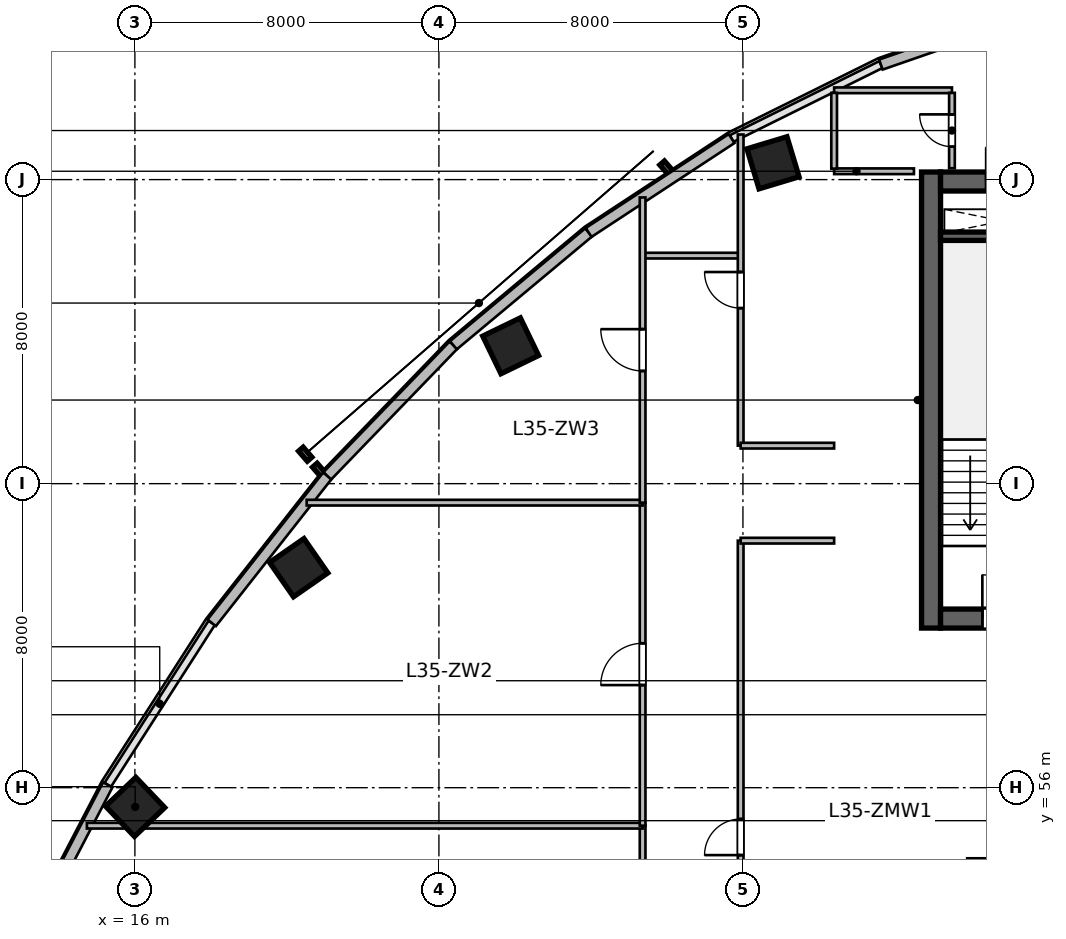
"""IFC4 building model, lengths in metres.
Left out: names, types, materials, properties, quantities, classifications, styles, units other than length and angle.
Written with IfcOpenShell. Run it as: python <this file> out.ifc"""

import sys

from ifc_helpers import new_model, si_unit, direction, frame, frame_2d, origin, origin_2d, place, context, subcontext, project, spatial, rectangle, extrude, source, transform, mapped, element, fill, save


model = new_model("IFC4")
c1 = context("Model", 3, precision=1e-05, world=origin(), true_north=direction((0.0, 1.0)))
c2 = subcontext(c1, "Body", "Model", "MODEL_VIEW")
j1 = project(units=[si_unit("LENGTHUNIT", "METRE"), si_unit("PLANEANGLEUNIT", "RADIAN")], contexts=[c1])
p1 = place(None, origin())
s1 = spatial("IfcSite", under=j1, at=p1, CompositionType="ELEMENT")
p2 = place(p1, origin())
s2 = spatial("IfcBuilding", under=s1, at=p2, CompositionType="ELEMENT")
p3 = place(p2, frame((0.0, 0.0, 146.7)))
s3 = spatial("IfcBuildingStorey", under=s2, at=p3, CompositionType="ELEMENT", Elevation=146.7)
m1 = source(origin(), c2, "Body", "SweptSolid", [
    extrude(rectangle(XDim=12.0, YDim=0.5, at=frame_2d((6.0, 0.0))), origin(), (0.0, 0.0, 1.0), 3.9),
])
p4 = place(p3, frame((36.95, 60.2, 0.0), z_axis=(0.0, 0.0, 1.0), x_axis=(0.0, 1.0, 0.0)))
e1 = element("IfcWall", 1, at=p4, inside=s3, PredefinedType="SHEAR", context=c2, shape_type="MappedRepresentation", body=[
    mapped(m1, transform((0.0, 0.0, 0.0), scale=1.0)),
])
m2 = source(origin(), c2, "Body", "SweptSolid", [
    extrude(rectangle(XDim=21.6, YDim=0.5, at=frame_2d((10.8, 0.0))), origin(), (0.0, 0.0, 1.0), 3.9),
])
p5 = place(p3, frame((37.2, 60.45, 0.0), z_axis=(0.0, 0.0, 1.0), x_axis=(1.0, 0.0, 0.0)))
e2 = element("IfcWall", 2, at=p5, inside=s3, PredefinedType="SHEAR", context=c2, shape_type="MappedRepresentation", body=[
    mapped(m2, transform((0.0, 0.0, 0.0), scale=1.0)),
])
p6 = place(p5, frame((1.1, 0.0, 0.0)))
e3 = element("IfcOpeningElement", 3, at=p6, cuts=e2, PredefinedType="OPENING", context=c2, shape_type="SweptSolid", body=[
    extrude(rectangle(XDim=1.15, YDim=2.15, at=frame_2d((0.575, 1.075))), frame((0.0, 0.26, 0.0), z_axis=(0.0, -1.0, 0.0), x_axis=(1.0, 0.0, 0.0)), (0.0, 0.0, 1.0), 0.52),
])
p7 = place(p5, frame((19.5, 0.0, 0.0)))
e4 = element("IfcOpeningElement", 4, at=p7, cuts=e2, PredefinedType="OPENING", context=c2, shape_type="SweptSolid", body=[
    extrude(rectangle(XDim=0.9, YDim=2.1, at=frame_2d((0.45, 1.05))), frame((0.0, 0.26, 0.0), z_axis=(0.0, -1.0, 0.0), x_axis=(1.0, 0.0, 0.0)), (0.0, 0.0, 1.0), 0.52),
])
p8 = place(p5, frame((12.02, 0.0, 0.0)))
e5 = element("IfcOpeningElement", 5, at=p8, cuts=e2, PredefinedType="OPENING", context=c2, shape_type="SweptSolid", body=[
    extrude(rectangle(XDim=1.6, YDim=2.15, at=frame_2d((0.8, 1.075))), frame((0.0, 0.26, 0.0), z_axis=(0.0, -1.0, 0.0), x_axis=(1.0, 0.0, 0.0)), (0.0, 0.0, 1.0), 0.52),
])
p9 = place(p3, frame((37.2, 71.95, 0.0), z_axis=(0.0, 0.0, 1.0), x_axis=(1.0, 0.0, 0.0)))
e6 = element("IfcWall", 6, at=p9, inside=s3, PredefinedType="SHEAR", context=c2, shape_type="MappedRepresentation", body=[
    mapped(m2, transform((0.0, 0.0, 0.0), scale=1.0)),
])
p10 = place(p9, frame((1.2, 0.0, 0.0)))
e7 = element("IfcOpeningElement", 7, at=p10, cuts=e6, PredefinedType="OPENING", context=c2, shape_type="SweptSolid", body=[
    extrude(rectangle(XDim=0.9, YDim=2.1, at=frame_2d((0.45, 1.05))), frame((0.0, 0.26, 0.0), z_axis=(0.0, -1.0, 0.0), x_axis=(1.0, 0.0, 0.0)), (0.0, 0.0, 1.0), 0.52),
])
p11 = place(p9, frame((14.7, 0.0, 0.0)))
e8 = element("IfcOpeningElement", 8, at=p11, cuts=e6, PredefinedType="OPENING", context=c2, shape_type="SweptSolid", body=[
    extrude(rectangle(XDim=1.2, YDim=2.15, at=frame_2d((0.6, 1.075))), frame((0.0, 0.26, 0.0), z_axis=(0.0, -1.0, 0.0), x_axis=(1.0, 0.0, 0.0)), (0.0, 0.0, 1.0), 0.52),
])
p12 = place(p9, frame((4.15, 0.0, 0.0)))
e9 = element("IfcOpeningElement", 9, at=p12, cuts=e6, PredefinedType="OPENING", context=c2, shape_type="SweptSolid", body=[
    extrude(rectangle(XDim=1.3, YDim=2.15, at=frame_2d((0.65, 1.075))), frame((0.0, 0.26, 0.0), z_axis=(0.0, -1.0, 0.0), x_axis=(1.0, 0.0, 0.0)), (0.0, 0.0, 1.0), 0.52),
])
p13 = place(p9, frame((6.76, 0.0, 0.0)))
e10 = element("IfcOpeningElement", 10, at=p13, cuts=e6, PredefinedType="OPENING", context=c2, shape_type="SweptSolid", body=[
    extrude(rectangle(XDim=0.85, YDim=2.1, at=frame_2d((0.425, 1.05))), frame((0.0, 0.26, 0.0), z_axis=(0.0, -1.0, 0.0), x_axis=(1.0, 0.0, 0.0)), (0.0, 0.0, 1.0), 0.52),
])
p14 = place(p9, frame((8.76, 0.0, 0.0)))
e11 = element("IfcOpeningElement", 11, at=p14, cuts=e6, PredefinedType="OPENING", context=c2, shape_type="SweptSolid", body=[
    extrude(rectangle(XDim=0.85, YDim=2.1, at=frame_2d((0.425, 1.05))), frame((0.0, 0.26, 0.0), z_axis=(0.0, -1.0, 0.0), x_axis=(1.0, 0.0, 0.0)), (0.0, 0.0, 1.0), 0.52),
])
p15 = place(p9, frame((10.725, 0.0, 0.0)))
e12 = element("IfcOpeningElement", 12, at=p15, cuts=e6, PredefinedType="OPENING", context=c2, shape_type="SweptSolid", body=[
    extrude(rectangle(XDim=0.85, YDim=2.1, at=frame_2d((0.425, 1.05))), frame((0.0, 0.26, 0.0), z_axis=(0.0, -1.0, 0.0), x_axis=(1.0, 0.0, 0.0)), (0.0, 0.0, 1.0), 0.52),
])
m3 = source(origin(), c2, "Body", "SweptSolid", [
    extrude(rectangle(XDim=3.27, YDim=0.22, at=frame_2d((1.635, 0.0))), origin(), (0.0, 0.0, 1.0), 3.9),
])
p16 = place(p3, frame((37.2, 70.51, 0.0), z_axis=(0.0, 0.0, 1.0), x_axis=(1.0, 0.0, 0.0)))
e13 = element("IfcWall", 13, at=p16, inside=s3, PredefinedType="SHEAR", context=c2, shape_type="MappedRepresentation", body=[
    mapped(m3, transform((0.0, 0.0, 0.0), scale=1.0)),
])
m4 = source(origin(), c2, "Body", "SweptSolid", [
    extrude(rectangle(XDim=1.1, YDim=1.1, at=origin_2d()), origin(), (0.0, 0.0, 1.0), 3.9),
])
for number, where, z_axis, x_axis in (
    (14, (16.007, 55.494, 0.0), (0.0, 0.0, 1.0), (-0.691, 0.723, 0.0)),
    (15, (20.311, 61.789, 0.0), (0.0, 0.0, 1.0), (-0.571, 0.821, 0.0)),
    (16, (25.888, 67.627, 0.0), (0.0, 0.0, 1.0), (-0.436, 0.9, 0.0)),
    (17, (32.791, 72.442, 0.0), (0.0, 0.0, 1.0), (-0.289, 0.957, 0.0)),
):
    element("IfcColumn", number, at=place(p3, frame(where, z_axis=z_axis, x_axis=x_axis)), inside=s3, PredefinedType="COLUMN", context=c2, shape_type="MappedRepresentation", body=[
        mapped(m4, transform((0.0, 0.0, 0.0), scale=1.0)),
    ])
m5 = source(origin(), c2, "Body", "SweptSolid", [
    extrude(rectangle(XDim=5.171, YDim=0.28, at=frame_2d((2.585, 0.0))), origin(), (0.0, 0.0, 1.0), 3.65),
])
p17 = place(p3, frame((12.898, 51.489, 0.0), z_axis=(0.0, 0.0, 1.0), x_axis=(0.461752581363, 0.887008767491, 0.0)))
e18 = element("IfcWall", 18, at=p17, inside=s3, PredefinedType="SOLIDWALL", context=c2, shape_type="MappedRepresentation", body=[
    mapped(m5, transform((0.0, 0.0, 0.0), scale=1.0)),
])
p18 = place(p17, frame((0.193, 0.0, 0.95)))
e19 = element("IfcOpeningElement", 19, at=p18, cuts=e18, PredefinedType="OPENING", context=c2, shape_type="SweptSolid", body=[
    extrude(rectangle(XDim=2.2, YDim=2.1, at=frame_2d((1.1, 1.05))), frame((0.0, 0.15, 0.0), z_axis=(0.0, -1.0, 0.0), x_axis=(1.0, 0.0, 0.0)), (0.0, 0.0, 1.0), 0.3),
])
m6 = source(origin(), c2, "Body", "SweptSolid", [
    extrude(rectangle(XDim=4.922, YDim=0.28, at=frame_2d((2.461, 0.0))), origin(), (0.0, 0.0, 1.0), 3.65),
])
p19 = place(p3, frame((18.021, 60.338, 0.0), z_axis=(0.0, 0.0, 1.0), x_axis=(0.61817639101, 0.786039407153, 0.0)))
e20 = element("IfcWall", 20, at=p19, inside=s3, PredefinedType="SOLIDWALL", context=c2, shape_type="MappedRepresentation", body=[
    mapped(m6, transform((0.0, 0.0, 0.0), scale=1.0)),
])
m7 = source(origin(), c2, "Body", "SweptSolid", [
    extrude(rectangle(XDim=4.776, YDim=0.28, at=frame_2d((2.388, 0.0))), origin(), (0.0, 0.0, 1.0), 3.65),
])
p20 = place(p3, frame((21.064, 64.206, 0.0), z_axis=(0.0, 0.0, 1.0), x_axis=(0.694601811851, 0.719394414055, 0.0)))
e21 = element("IfcWall", 21, at=p20, inside=s3, PredefinedType="SOLIDWALL", context=c2, shape_type="MappedRepresentation", body=[
    mapped(m7, transform((0.0, 0.0, 0.0), scale=1.0)),
])
m8 = source(origin(), c2, "Body", "SweptSolid", [
    extrude(rectangle(XDim=4.634, YDim=0.28, at=frame_2d((2.317, 0.0))), origin(), (0.0, 0.0, 1.0), 3.65),
])
p21 = place(p3, frame((24.381, 67.642, 0.0), z_axis=(0.0, 0.0, 1.0), x_axis=(0.767910229096, 0.640557475993, 0.0)))
e22 = element("IfcWall", 22, at=p21, inside=s3, PredefinedType="SOLIDWALL", context=c2, shape_type="MappedRepresentation", body=[
    mapped(m8, transform((0.0, 0.0, 0.0), scale=1.0)),
])
m9 = source(origin(), c2, "Body", "SweptSolid", [
    extrude(rectangle(XDim=4.501, YDim=0.28, at=frame_2d((2.25, 0.0))), origin(), (0.0, 0.0, 1.0), 3.65),
])
p22 = place(p3, frame((27.939, 70.61, 0.0), z_axis=(0.0, 0.0, 1.0), x_axis=(0.835984920737, 0.548752414391, 0.0)))
e23 = element("IfcWall", 23, at=p22, inside=s3, PredefinedType="SOLIDWALL", context=c2, shape_type="MappedRepresentation", body=[
    mapped(m9, transform((0.0, 0.0, 0.0), scale=1.0)),
])
m10 = source(origin(), c2, "Body", "SweptSolid", [
    extrude(rectangle(XDim=4.29, YDim=0.28, at=frame_2d((2.145, 0.0))), origin(), (0.0, 0.0, 1.0), 3.65),
])
p23 = place(p3, frame((35.63, 75.027, 0.0), z_axis=(0.0, 0.0, 1.0), x_axis=(0.944883859218, 0.3274057003, 0.0)))
e24 = element("IfcWall", 24, at=p23, inside=s3, PredefinedType="SOLIDWALL", context=c2, shape_type="MappedRepresentation", body=[
    mapped(m10, transform((0.0, 0.0, 0.0), scale=1.0)),
])
m11 = source(origin(), c2, "Body", "SweptSolid", [
    extrude(rectangle(XDim=2.1, YDim=0.15, at=frame_2d((1.05, 0.0))), origin(), (0.0, 0.0, 1.0), 3.65),
])
p24 = place(p3, frame((34.4, 72.22, 0.0), z_axis=(0.0, 0.0, 1.0), x_axis=(1.0, 0.0, 0.0)))
e25 = element("IfcWall", 25, at=p24, inside=s3, PredefinedType="PARTITIONING", context=c2, shape_type="MappedRepresentation", body=[
    mapped(m11, transform((0.0, 0.0, 0.0), scale=1.0)),
])
m12 = source(origin(), c2, "Body", "SweptSolid", [
    extrude(rectangle(XDim=3.1, YDim=0.15, at=frame_2d((1.55, 0.0))), origin(), (0.0, 0.0, 1.0), 3.022),
])
p25 = place(p3, frame((34.4, 74.35, 0.0), z_axis=(0.0, 0.0, 1.0), x_axis=(1.0, 0.0, 0.0)))
e26 = element("IfcWall", 26, at=p25, inside=s3, PredefinedType="PARTITIONING", context=c2, shape_type="MappedRepresentation", body=[
    mapped(m12, transform((0.0, 0.0, 0.0), scale=1.0)),
])
m13 = source(origin(), c2, "Body", "SweptSolid", [
    extrude(rectangle(XDim=1.995, YDim=0.15, at=frame_2d((0.998, 0.0))), origin(), (0.0, 0.0, 1.0), 3.65),
])
p26 = place(p3, frame((34.4, 72.288, 0.0), z_axis=(0.0, 0.0, 1.0), x_axis=(0.0, 1.0, 0.0)))
e27 = element("IfcWall", 27, at=p26, inside=s3, PredefinedType="PARTITIONING", context=c2, shape_type="MappedRepresentation", body=[
    mapped(m13, transform((0.0, 0.0, 0.0), scale=1.0)),
])
m14 = source(origin(), c2, "Body", "SweptSolid", [
    extrude(rectangle(XDim=1.982, YDim=0.15, at=frame_2d((0.991, 0.0))), origin(), (0.0, 0.0, 1.0), 3.65),
])
p27 = place(p3, frame((37.5, 72.3, 0.0), z_axis=(0.0, 0.0, 1.0), x_axis=(0.0, 1.0, 0.0)))
e28 = element("IfcWall", 28, at=p27, inside=s3, PredefinedType="PARTITIONING", context=c2, shape_type="MappedRepresentation", body=[
    mapped(m14, transform((0.0, 0.0, 0.0), scale=1.0)),
])
p28 = place(p27, frame((0.566, 0.0, 0.0)))
e29 = element("IfcOpeningElement", 29, at=p28, cuts=e28, PredefinedType="OPENING", context=c2, shape_type="SweptSolid", body=[
    extrude(rectangle(XDim=0.85, YDim=2.1, at=frame_2d((0.425, 1.05))), frame((0.0, 0.085, 0.0), z_axis=(0.0, -1.0, 0.0), x_axis=(1.0, 0.0, 0.0)), (0.0, 0.0, 1.0), 0.17),
])
m15 = source(origin(), c2, "Body", "SweptSolid", [
    extrude(rectangle(XDim=2.5, YDim=0.15, at=frame_2d((1.25, 0.0))), origin(), (0.0, 0.0, 1.0), 3.65),
])
p29 = place(p3, frame((29.4, 70.0, 0.0), z_axis=(0.0, 0.0, 1.0), x_axis=(1.0, 0.0, 0.0)))
e30 = element("IfcWall", 30, at=p29, inside=s3, PredefinedType="PARTITIONING", context=c2, shape_type="MappedRepresentation", body=[
    mapped(m15, transform((0.0, 0.0, 0.0), scale=1.0)),
])
m16 = source(origin(), c2, "Body", "SweptSolid", [
    extrude(rectangle(XDim=11.612, YDim=0.15, at=frame_2d((5.806, 0.0))), origin(), (0.0, 0.0, 1.0), 2.942),
])
p30 = place(p3, frame((29.36, 43.388, 0.0), z_axis=(0.0, 0.0, 1.0), x_axis=(0.0, 1.0, 0.0)))
e31 = element("IfcWall", 31, at=p30, inside=s3, PredefinedType="PARTITIONING", context=c2, shape_type="MappedRepresentation", body=[
    mapped(m16, transform((0.0, 0.0, 0.0), scale=1.0)),
])
p31 = place(p30, frame((6.962, 0.0, 0.0)))
e32 = element("IfcOpeningElement", 32, at=p31, cuts=e31, PredefinedType="OPENING", context=c2, shape_type="SweptSolid", body=[
    extrude(rectangle(XDim=1.1, YDim=2.15, at=frame_2d((0.55, 1.075))), frame((0.0, 0.085, 0.0), z_axis=(0.0, -1.0, 0.0), x_axis=(1.0, 0.0, 0.0)), (0.0, 0.0, 1.0), 0.17),
])
m17 = source(origin(), c2, "Body", "SweptSolid", [
    extrude(rectangle(XDim=14.623, YDim=0.15, at=frame_2d((7.312, 0.0))), origin(), (0.0, 0.0, 1.0), 3.65),
])
p32 = place(p3, frame((14.737, 55.0, 0.0), z_axis=(0.0, 0.0, 1.0), x_axis=(1.0, 0.0, 0.0)))
e33 = element("IfcWall", 33, at=p32, inside=s3, PredefinedType="PARTITIONING", context=c2, shape_type="MappedRepresentation", body=[
    mapped(m17, transform((0.0, 0.0, 0.0), scale=1.0)),
])
m18 = source(origin(), c2, "Body", "SweptSolid", [
    extrude(rectangle(XDim=8.5, YDim=0.15, at=frame_2d((4.25, 0.0))), origin(), (0.0, 0.0, 1.0), 2.942),
])
p33 = place(p3, frame((29.36, 55.0, 0.0), z_axis=(0.0, 0.0, 1.0), x_axis=(0.0, 1.0, 0.0)))
e34 = element("IfcWall", 34, at=p33, inside=s3, PredefinedType="PARTITIONING", context=c2, shape_type="MappedRepresentation", body=[
    mapped(m18, transform((0.0, 0.0, 0.0), scale=1.0)),
])
p34 = place(p33, frame((3.7, 0.0, 0.0)))
e35 = element("IfcOpeningElement", 35, at=p34, cuts=e34, PredefinedType="OPENING", context=c2, shape_type="SweptSolid", body=[
    extrude(rectangle(XDim=1.1, YDim=2.15, at=frame_2d((0.55, 1.075))), frame((0.0, 0.085, 0.0), z_axis=(0.0, -1.0, 0.0), x_axis=(1.0, 0.0, 0.0)), (0.0, 0.0, 1.0), 0.17),
])
m19 = source(origin(), c2, "Body", "SweptSolid", [
    extrude(rectangle(XDim=8.839, YDim=0.15, at=frame_2d((4.419, 0.0))), origin(), (0.0, 0.0, 1.0), 3.65),
])
p35 = place(p3, frame((20.521, 63.5, 0.0), z_axis=(0.0, 0.0, 1.0), x_axis=(1.0, 0.0, 0.0)))
e36 = element("IfcWall", 36, at=p35, inside=s3, PredefinedType="PARTITIONING", context=c2, shape_type="MappedRepresentation", body=[
    mapped(m19, transform((0.0, 0.0, 0.0), scale=1.0)),
])
m20 = source(origin(), c2, "Body", "SweptSolid", [
    extrude(rectangle(XDim=8.031, YDim=0.15, at=frame_2d((4.015, 0.0))), origin(), (0.0, 0.0, 1.0), 3.65),
])
p36 = place(p3, frame((29.36, 63.5, 0.0), z_axis=(0.0, 0.0, 1.0), x_axis=(0.0, 1.0, 0.0)))
e37 = element("IfcWall", 37, at=p36, inside=s3, PredefinedType="PARTITIONING", context=c2, shape_type="MappedRepresentation", body=[
    mapped(m20, transform((0.0, 0.0, 0.0), scale=1.0)),
])
p37 = place(p36, frame((3.465, 0.0, 0.0)))
e38 = element("IfcOpeningElement", 38, at=p37, cuts=e37, PredefinedType="OPENING", context=c2, shape_type="SweptSolid", body=[
    extrude(rectangle(XDim=1.1, YDim=2.15, at=frame_2d((0.55, 1.075))), frame((0.0, 0.085, 0.0), z_axis=(0.0, -1.0, 0.0), x_axis=(1.0, 0.0, 0.0)), (0.0, 0.0, 1.0), 0.17),
])
m21 = source(origin(), c2, "Body", "SweptSolid", [
    extrude(rectangle(XDim=15.598, YDim=0.15, at=frame_2d((7.799, 0.0))), origin(), (0.0, 0.0, 1.0), 2.942),
])
p38 = place(p3, frame((31.94, 46.902, 0.0), z_axis=(0.0, 0.0, 1.0), x_axis=(0.0, 1.0, 0.0)))
e39 = element("IfcWall", 39, at=p38, inside=s3, PredefinedType="PARTITIONING", context=c2, shape_type="MappedRepresentation", body=[
    mapped(m21, transform((0.0, 0.0, 0.0), scale=1.0)),
])
p39 = place(p38, frame((7.324, 0.0, 0.0)))
e40 = element("IfcOpeningElement", 40, at=p39, cuts=e39, PredefinedType="OPENING", context=c2, shape_type="SweptSolid", body=[
    extrude(rectangle(XDim=0.95, YDim=2.1, at=frame_2d((0.475, 1.05))), frame((0.0, 0.085, 0.0), z_axis=(0.0, -1.0, 0.0), x_axis=(1.0, 0.0, 0.0)), (0.0, 0.0, 1.0), 0.17),
])
m22 = source(origin(), c2, "Body", "SweptSolid", [
    extrude(rectangle(XDim=2.46, YDim=0.15, at=frame_2d((1.23, 0.0))), origin(), (0.0, 0.0, 1.0), 3.65),
])
p40 = place(p3, frame((31.94, 62.5, 0.0), z_axis=(0.0, 0.0, 1.0), x_axis=(1.0, 0.0, 0.0)))
e41 = element("IfcWall", 41, at=p40, inside=s3, PredefinedType="PARTITIONING", context=c2, shape_type="MappedRepresentation", body=[
    mapped(m22, transform((0.0, 0.0, 0.0), scale=1.0)),
])
m23 = source(origin(), c2, "Body", "SweptSolid", [
    extrude(rectangle(XDim=8.187, YDim=0.15, at=frame_2d((4.093, 0.0))), origin(), (0.0, 0.0, 1.0), 3.65),
])
p41 = place(p3, frame((31.94, 65.0, 0.0), z_axis=(0.0, 0.0, 1.0), x_axis=(0.0, 1.0, 0.0)))
e42 = element("IfcWall", 42, at=p41, inside=s3, PredefinedType="PARTITIONING", context=c2, shape_type="MappedRepresentation", body=[
    mapped(m23, transform((0.0, 0.0, 0.0), scale=1.0)),
])
p42 = place(p41, frame((3.618, 0.0, 0.0)))
e43 = element("IfcOpeningElement", 43, at=p42, cuts=e42, PredefinedType="OPENING", context=c2, shape_type="SweptSolid", body=[
    extrude(rectangle(XDim=0.95, YDim=2.1, at=frame_2d((0.475, 1.05))), frame((0.0, 0.085, 0.0), z_axis=(0.0, -1.0, 0.0), x_axis=(1.0, 0.0, 0.0)), (0.0, 0.0, 1.0), 0.17),
])
p43 = place(p3, frame((31.94, 65.0, 0.0), z_axis=(0.0, 0.0, 1.0), x_axis=(1.0, 0.0, 0.0)))
e44 = element("IfcWall", 44, at=p43, inside=s3, PredefinedType="PARTITIONING", context=c2, shape_type="MappedRepresentation", body=[
    mapped(m22, transform((0.0, 0.0, 0.0), scale=1.0)),
])
m24 = source(origin(), c2, "Body", "SweptSolid", [
    extrude(rectangle(XDim=1.15, YDim=2.15, at=frame_2d((0.575, 1.075))), frame((0.0, 0.025, 0.0), z_axis=(0.0, -1.0, 0.0), x_axis=(1.0, 0.0, 0.0)), (0.0, 0.0, 1.0), 0.05),
])
p44 = place(p6, origin())
e45 = element("IfcDoor", 45, at=p44, inside=s3, OperationType="SINGLE_SWING_LEFT", PredefinedType="DOOR", context=c2, shape_type="MappedRepresentation", body=[
    mapped(m24, transform((0.0, 0.0, 0.0), scale=1.0)),
])
fill(e3, e45)
m25 = source(origin(), c2, "Body", "SweptSolid", [
    extrude(rectangle(XDim=0.9, YDim=2.1, at=frame_2d((0.45, 1.05))), frame((0.0, 0.025, 0.0), z_axis=(0.0, -1.0, 0.0), x_axis=(1.0, 0.0, 0.0)), (0.0, 0.0, 1.0), 0.05),
])
p45 = place(p10, origin())
e46 = element("IfcDoor", 46, at=p45, inside=s3, OperationType="SINGLE_SWING_LEFT", PredefinedType="DOOR", context=c2, shape_type="MappedRepresentation", body=[
    mapped(m25, transform((0.0, 0.0, 0.0), scale=1.0)),
])
fill(e7, e46)
m26 = source(origin(), c2, "Body", "SweptSolid", [
    extrude(rectangle(XDim=0.85, YDim=2.1, at=frame_2d((0.425, 1.05))), frame((0.0, 0.025, 0.0), z_axis=(0.0, -1.0, 0.0), x_axis=(1.0, 0.0, 0.0)), (0.0, 0.0, 1.0), 0.05),
])
p46 = place(p28, origin())
e47 = element("IfcDoor", 47, at=p46, inside=s3, OperationType="SINGLE_SWING_RIGHT", PredefinedType="DOOR", context=c2, shape_type="MappedRepresentation", body=[
    mapped(m26, transform((0.0, 0.0, 0.0), scale=1.0)),
])
fill(e29, e47)
m27 = source(origin(), c2, "Body", "SweptSolid", [
    extrude(rectangle(XDim=1.1, YDim=2.15, at=frame_2d((0.55, 1.075))), frame((0.0, 0.025, 0.0), z_axis=(0.0, -1.0, 0.0), x_axis=(1.0, 0.0, 0.0)), (0.0, 0.0, 1.0), 0.05),
])
p47 = place(p34, origin())
e48 = element("IfcDoor", 48, at=p47, inside=s3, OperationType="SINGLE_SWING_LEFT", PredefinedType="DOOR", context=c2, shape_type="MappedRepresentation", body=[
    mapped(m27, transform((0.0, 0.0, 0.0), scale=1.0)),
])
fill(e35, e48)
p48 = place(p37, origin())
e49 = element("IfcDoor", 49, at=p48, inside=s3, OperationType="SINGLE_SWING_RIGHT", PredefinedType="DOOR", context=c2, shape_type="MappedRepresentation", body=[
    mapped(m27, transform((0.0, 0.0, 0.0), scale=1.0)),
])
fill(e38, e49)
m28 = source(origin(), c2, "Body", "SweptSolid", [
    extrude(rectangle(XDim=0.95, YDim=2.1, at=frame_2d((0.475, 1.05))), frame((0.0, 0.025, 0.0), z_axis=(0.0, -1.0, 0.0), x_axis=(1.0, 0.0, 0.0)), (0.0, 0.0, 1.0), 0.05),
])
p49 = place(p39, origin())
e50 = element("IfcDoor", 50, at=p49, inside=s3, OperationType="SINGLE_SWING_LEFT", PredefinedType="DOOR", context=c2, shape_type="MappedRepresentation", body=[
    mapped(m28, transform((0.0, 0.0, 0.0), scale=1.0)),
])
fill(e40, e50)
p50 = place(p42, origin())
e51 = element("IfcDoor", 51, at=p50, inside=s3, OperationType="SINGLE_SWING_RIGHT", PredefinedType="DOOR", context=c2, shape_type="MappedRepresentation", body=[
    mapped(m28, transform((0.0, 0.0, 0.0), scale=1.0)),
])
fill(e43, e51)
save(model, sys.argv[1])
